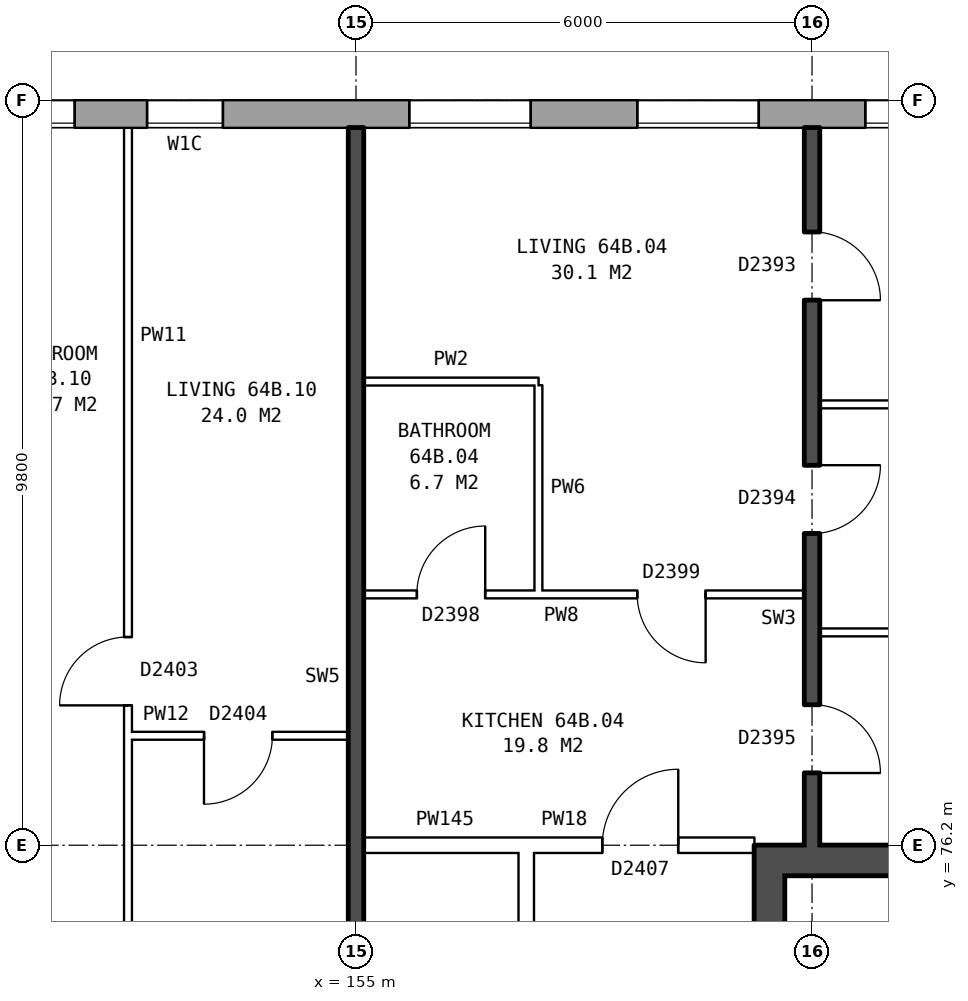
"""IFC4 building model, lengths in metres.
Left out: names, types, materials, properties, quantities, classifications, styles, units other than length and angle.
Written with IfcOpenShell. Run it as: python <this file> out.ifc"""

import sys

from ifc_helpers import new_model, si_unit, direction, frame, frame_2d, origin, place, context, subcontext, project, spatial, rectangle, extrude, element, fill, save


model = new_model("IFC4")
c1 = context("Model", 3, precision=1e-05, world=origin(), true_north=direction((0.0, 1.0)))
c2 = subcontext(c1, "Body", "Model", "MODEL_VIEW")
j1 = project(units=[si_unit("LENGTHUNIT", "METRE"), si_unit("PLANEANGLEUNIT", "RADIAN")], contexts=[c1])
p1 = place(None, origin())
s1 = spatial("IfcSite", under=j1, at=p1, CompositionType="ELEMENT")
p2 = place(p1, origin())
s2 = spatial("IfcBuilding", under=s1, at=p2, CompositionType="ELEMENT")
p3 = place(p2, frame((0.0, 0.0, 227.6)))
s3 = spatial("IfcBuildingStorey", under=s2, at=p3, CompositionType="ELEMENT", Elevation=227.6)
p4 = place(p3, frame((165.925, 85.82, 0.0), z_axis=(0.0, 0.0, 1.0), x_axis=(-1.0, 0.0, 0.0)))
e1 = element("IfcWall", 1, at=p4, inside=s3, PredefinedType="STANDARD", context=c2, shape_type="SweptSolid", body=[
    extrude(rectangle(XDim=33.875, YDim=0.36, at=frame_2d((16.938, 0.0))), origin(), (0.0, 0.0, 1.0), 2.85),
])
p5 = place(p4, frame((2.625, 0.0, 0.8)))
e2 = element("IfcOpeningElement", 2, at=p5, cuts=e1, PredefinedType="OPENING", context=c2, shape_type="SweptSolid", body=[
    extrude(rectangle(XDim=1.6, YDim=1.8, at=frame_2d((0.8, 0.9))), frame((0.0, 0.19, 0.0), z_axis=(0.0, -1.0, 0.0), x_axis=(1.0, 0.0, 0.0)), (0.0, 0.0, 1.0), 0.38),
])
p6 = place(p4, frame((5.625, 0.0, 0.8)))
e3 = element("IfcOpeningElement", 3, at=p6, cuts=e1, PredefinedType="OPENING", context=c2, shape_type="SweptSolid", body=[
    extrude(rectangle(XDim=1.6, YDim=1.8, at=frame_2d((0.8, 0.9))), frame((0.0, 0.19, 0.0), z_axis=(0.0, -1.0, 0.0), x_axis=(1.0, 0.0, 0.0)), (0.0, 0.0, 1.0), 0.38),
])
p7 = place(p4, frame((8.625, 0.0, 0.8)))
e4 = element("IfcOpeningElement", 4, at=p7, cuts=e1, PredefinedType="OPENING", context=c2, shape_type="SweptSolid", body=[
    extrude(rectangle(XDim=1.6, YDim=1.8, at=frame_2d((0.8, 0.9))), frame((0.0, 0.19, 0.0), z_axis=(0.0, -1.0, 0.0), x_axis=(1.0, 0.0, 0.0)), (0.0, 0.0, 1.0), 0.38),
])
p8 = place(p4, frame((12.675, 0.0, 0.15)))
e5 = element("IfcOpeningElement", 5, at=p8, cuts=e1, PredefinedType="OPENING", context=c2, shape_type="SweptSolid", body=[
    extrude(rectangle(XDim=1.0, YDim=1.8, at=frame_2d((0.5, 0.9))), frame((0.0, 0.19, 0.0), z_axis=(0.0, -1.0, 0.0), x_axis=(1.0, 0.0, 0.0)), (0.0, 0.0, 1.0), 0.38),
])
p9 = place(p4, frame((14.625, 0.0, 0.8)))
e6 = element("IfcOpeningElement", 6, at=p9, cuts=e1, PredefinedType="OPENING", context=c2, shape_type="SweptSolid", body=[
    extrude(rectangle(XDim=1.6, YDim=1.8, at=frame_2d((0.8, 0.9))), frame((0.0, 0.19, 0.0), z_axis=(0.0, -1.0, 0.0), x_axis=(1.0, 0.0, 0.0)), (0.0, 0.0, 1.0), 0.38),
])
p10 = place(p4, frame((17.125, 0.0, 0.8)))
e7 = element("IfcOpeningElement", 7, at=p10, cuts=e1, PredefinedType="OPENING", context=c2, shape_type="SweptSolid", body=[
    extrude(rectangle(XDim=1.6, YDim=1.8, at=frame_2d((0.8, 0.9))), frame((0.0, 0.19, 0.0), z_axis=(0.0, -1.0, 0.0), x_axis=(1.0, 0.0, 0.0)), (0.0, 0.0, 1.0), 0.38),
])
p11 = place(p4, frame((20.425, 0.0, 1.7)))
e8 = element("IfcOpeningElement", 8, at=p11, cuts=e1, PredefinedType="OPENING", context=c2, shape_type="SweptSolid", body=[
    extrude(rectangle(XDim=0.6, YDim=0.9, at=frame_2d((0.3, 0.45))), frame((0.0, 0.19, 0.0), z_axis=(0.0, -1.0, 0.0), x_axis=(1.0, 0.0, 0.0)), (0.0, 0.0, 1.0), 0.38),
])
p12 = place(p4, frame((23.625, 0.0, 0.8)))
e9 = element("IfcOpeningElement", 9, at=p12, cuts=e1, PredefinedType="OPENING", context=c2, shape_type="SweptSolid", body=[
    extrude(rectangle(XDim=1.6, YDim=1.8, at=frame_2d((0.8, 0.9))), frame((0.0, 0.19, 0.0), z_axis=(0.0, -1.0, 0.0), x_axis=(1.0, 0.0, 0.0)), (0.0, 0.0, 1.0), 0.38),
])
p13 = place(p4, frame((26.625, 0.0, 0.8)))
e10 = element("IfcOpeningElement", 10, at=p13, cuts=e1, PredefinedType="OPENING", context=c2, shape_type="SweptSolid", body=[
    extrude(rectangle(XDim=1.6, YDim=1.8, at=frame_2d((0.8, 0.9))), frame((0.0, 0.19, 0.0), z_axis=(0.0, -1.0, 0.0), x_axis=(1.0, 0.0, 0.0)), (0.0, 0.0, 1.0), 0.38),
])
p14 = place(p4, frame((29.625, 0.0, 0.8)))
e11 = element("IfcOpeningElement", 11, at=p14, cuts=e1, PredefinedType="OPENING", context=c2, shape_type="SweptSolid", body=[
    extrude(rectangle(XDim=1.6, YDim=1.8, at=frame_2d((0.8, 0.9))), frame((0.0, 0.19, 0.0), z_axis=(0.0, -1.0, 0.0), x_axis=(1.0, 0.0, 0.0)), (0.0, 0.0, 1.0), 0.38),
])
p15 = place(p4, frame((21.325, 0.0, 0.8)))
e12 = element("IfcOpeningElement", 12, at=p15, cuts=e1, PredefinedType="OPENING", context=c2, shape_type="SweptSolid", body=[
    extrude(rectangle(XDim=1.4, YDim=1.8, at=frame_2d((0.7, 0.9))), frame((0.0, 0.19, 0.0), z_axis=(0.0, -1.0, 0.0), x_axis=(1.0, 0.0, 0.0)), (0.0, 0.0, 1.0), 0.38),
])
p16 = place(p3, frame((160.44, 76.2, 0.0), z_axis=(0.0, 0.0, 1.0), x_axis=(0.0, -1.0, 0.0)))
e13 = element("IfcWall", 13, at=p16, inside=s3, PredefinedType="SHEAR", context=c2, shape_type="SweptSolid", body=[
    extrude(rectangle(XDim=12.4, YDim=0.4, at=frame_2d((6.2, 0.0))), origin(), (0.0, 0.0, 1.0), 2.85),
])
p17 = place(p16, frame((1.325, 0.0, 0.0)))
e14 = element("IfcOpeningElement", 14, at=p17, cuts=e13, PredefinedType="OPENING", context=c2, shape_type="SweptSolid", body=[
    extrude(rectangle(XDim=1.1, YDim=2.1, at=frame_2d((0.55, 1.05))), frame((0.0, 0.21, 0.0), z_axis=(0.0, -1.0, 0.0), x_axis=(1.0, 0.0, 0.0)), (0.0, 0.0, 1.0), 0.42),
])
p18 = place(p16, frame((3.625, 0.0, 0.0)))
e15 = element("IfcOpeningElement", 15, at=p18, cuts=e13, PredefinedType="OPENING", context=c2, shape_type="SweptSolid", body=[
    extrude(rectangle(XDim=0.85, YDim=2.1, at=frame_2d((0.425, 1.05))), frame((0.0, 0.21, 0.0), z_axis=(0.0, -1.0, 0.0), x_axis=(1.0, 0.0, 0.0)), (0.0, 0.0, 1.0), 0.42),
])
p19 = place(p16, frame((5.775, 0.0, 0.0)))
e16 = element("IfcOpeningElement", 16, at=p19, cuts=e13, PredefinedType="OPENING", context=c2, shape_type="SweptSolid", body=[
    extrude(rectangle(XDim=0.85, YDim=2.1, at=frame_2d((0.425, 1.05))), frame((0.0, 0.21, 0.0), z_axis=(0.0, -1.0, 0.0), x_axis=(1.0, 0.0, 0.0)), (0.0, 0.0, 1.0), 0.42),
])
p20 = place(p16, frame((9.9, 0.0, 0.0)))
e17 = element("IfcOpeningElement", 17, at=p20, cuts=e13, PredefinedType="OPENING", context=c2, shape_type="SweptSolid", body=[
    extrude(rectangle(XDim=1.1, YDim=2.1, at=frame_2d((0.55, 1.05))), frame((0.0, 0.21, 0.0), z_axis=(0.0, -1.0, 0.0), x_axis=(1.0, 0.0, 0.0)), (0.0, 0.0, 1.0), 0.42),
])
p21 = place(p16, frame((8.125, 0.0, 0.0)))
e18 = element("IfcOpeningElement", 18, at=p21, cuts=e13, PredefinedType="OPENING", context=c2, shape_type="SweptSolid", body=[
    extrude(rectangle(XDim=0.85, YDim=2.1, at=frame_2d((0.425, 1.05))), frame((0.0, 0.21, 0.0), z_axis=(0.0, -1.0, 0.0), x_axis=(1.0, 0.0, 0.0)), (0.0, 0.0, 1.0), 0.42),
])
p22 = place(p3, frame((160.64, 76.0, 0.0), z_axis=(0.0, 0.0, 1.0), x_axis=(1.0, 0.0, 0.0)))
e19 = element("IfcWall", 19, at=p22, inside=s3, PredefinedType="SHEAR", context=c2, shape_type="SweptSolid", body=[
    extrude(rectangle(XDim=7.6, YDim=0.4, at=frame_2d((3.8, 0.0))), origin(), (0.0, 0.0, 1.0), 2.85),
])
p23 = place(p3, frame((157.24, 63.9, 0.0), z_axis=(0.0, 0.0, 1.0), x_axis=(0.0, 1.0, 0.0)))
e20 = element("IfcWall", 20, at=p23, inside=s3, PredefinedType="PARTITIONING", context=c2, shape_type="SweptSolid", body=[
    extrude(rectangle(XDim=12.2, YDim=0.2, at=frame_2d((6.1, 0.0))), origin(), (0.0, 0.0, 1.0), 2.85),
])
p24 = place(p23, frame((5.1, 0.0, 0.0)))
e21 = element("IfcOpeningElement", 21, at=p24, cuts=e20, PredefinedType="OPENING", context=c2, shape_type="SweptSolid", body=[
    extrude(rectangle(XDim=2.0, YDim=2.1, at=frame_2d((1.0, 1.05))), frame((0.0, 0.11, 0.0), z_axis=(0.0, -1.0, 0.0), x_axis=(1.0, 0.0, 0.0)), (0.0, 0.0, 1.0), 0.22),
])
p25 = place(p3, frame((155.1, 76.2, 0.0), z_axis=(0.0, 0.0, 1.0), x_axis=(1.0, 0.0, 0.0)))
e22 = element("IfcWall", 22, at=p25, inside=s3, PredefinedType="PARTITIONING", context=c2, shape_type="SweptSolid", body=[
    extrude(rectangle(XDim=2.14, YDim=0.2, at=frame_2d((1.07, 0.0))), origin(), (0.0, 0.0, 1.0), 2.85),
])
p26 = place(p3, frame((157.24, 76.2, 0.0), z_axis=(0.0, 0.0, 1.0), x_axis=(1.0, 0.0, 0.0)))
e23 = element("IfcWall", 23, at=p26, inside=s3, PredefinedType="PARTITIONING", context=c2, shape_type="SweptSolid", body=[
    extrude(rectangle(XDim=3.0, YDim=0.2, at=frame_2d((1.5, 0.0))), origin(), (0.0, 0.0, 1.0), 2.85),
])
p27 = place(p26, frame((1.0, 0.0, 0.0)))
e24 = element("IfcOpeningElement", 24, at=p27, cuts=e23, PredefinedType="OPENING", context=c2, shape_type="SweptSolid", body=[
    extrude(rectangle(XDim=1.0, YDim=2.1, at=frame_2d((0.5, 1.05))), frame((0.0, 0.11, 0.0), z_axis=(0.0, -1.0, 0.0), x_axis=(1.0, 0.0, 0.0)), (0.0, 0.0, 1.0), 0.22),
])
p28 = place(p3, frame((152.0, 77.64, 0.0), z_axis=(0.0, 0.0, 1.0), x_axis=(1.0, 0.0, 0.0)))
e25 = element("IfcWall", 25, at=p28, inside=s3, PredefinedType="PARTITIONING", context=c2, shape_type="SweptSolid", body=[
    extrude(rectangle(XDim=2.9, YDim=0.1, at=frame_2d((1.45, 0.0))), origin(), (0.0, 0.0, 1.0), 2.85),
])
p29 = place(p28, frame((1.0, 0.0, 0.0)))
e26 = element("IfcOpeningElement", 26, at=p29, cuts=e25, PredefinedType="OPENING", context=c2, shape_type="SweptSolid", body=[
    extrude(rectangle(XDim=0.9, YDim=2.1, at=frame_2d((0.45, 1.05))), frame((0.0, 0.06, 0.0), z_axis=(0.0, -1.0, 0.0), x_axis=(1.0, 0.0, 0.0)), (0.0, 0.0, 1.0), 0.12),
])
p30 = place(p3, frame((161.1, 79.0, 0.0), z_axis=(0.0, 0.0, 1.0), x_axis=(1.0, 0.0, 0.0)))
e27 = element("IfcWall", 27, at=p30, inside=s3, PredefinedType="PARTITIONING", context=c2, shape_type="SweptSolid", body=[
    extrude(rectangle(XDim=7.54, YDim=0.1, at=frame_2d((3.77, 0.0))), origin(), (0.0, 0.0, 1.0), 2.85),
])
p31 = place(p3, frame((155.1, 79.5, 0.0), z_axis=(0.0, 0.0, 1.0), x_axis=(1.0, 0.0, 0.0)))
e28 = element("IfcWall", 28, at=p31, inside=s3, PredefinedType="PARTITIONING", context=c2, shape_type="SweptSolid", body=[
    extrude(rectangle(XDim=5.8, YDim=0.1, at=frame_2d((2.9, 0.0))), origin(), (0.0, 0.0, 1.0), 2.85),
])
p32 = place(p31, frame((3.6, 0.0, 0.0)))
e29 = element("IfcOpeningElement", 29, at=p32, cuts=e28, PredefinedType="OPENING", context=c2, shape_type="SweptSolid", body=[
    extrude(rectangle(XDim=0.9, YDim=2.1, at=frame_2d((0.45, 1.05))), frame((0.0, 0.06, 0.0), z_axis=(0.0, -1.0, 0.0), x_axis=(1.0, 0.0, 0.0)), (0.0, 0.0, 1.0), 0.12),
])
p33 = place(p31, frame((0.7, 0.0, 0.0)))
e30 = element("IfcOpeningElement", 30, at=p33, cuts=e28, PredefinedType="OPENING", context=c2, shape_type="SweptSolid", body=[
    extrude(rectangle(XDim=0.9, YDim=2.1, at=frame_2d((0.45, 1.05))), frame((0.0, 0.06, 0.0), z_axis=(0.0, -1.0, 0.0), x_axis=(1.0, 0.0, 0.0)), (0.0, 0.0, 1.0), 0.12),
])
p34 = place(p3, frame((161.1, 82.0, 0.0), z_axis=(0.0, 0.0, 1.0), x_axis=(1.0, 0.0, 0.0)))
e31 = element("IfcWall", 31, at=p34, inside=s3, PredefinedType="PARTITIONING", context=c2, shape_type="SweptSolid", body=[
    extrude(rectangle(XDim=7.54, YDim=0.1, at=frame_2d((3.77, 0.0))), origin(), (0.0, 0.0, 1.0), 2.85),
])
p35 = place(p3, frame((155.1, 82.3, 0.0), z_axis=(0.0, 0.0, 1.0), x_axis=(1.0, 0.0, 0.0)))
e32 = element("IfcWall", 32, at=p35, inside=s3, PredefinedType="PARTITIONING", context=c2, shape_type="SweptSolid", body=[
    extrude(rectangle(XDim=2.3, YDim=0.1, at=frame_2d((1.15, 0.0))), origin(), (0.0, 0.0, 1.0), 2.85),
])
p36 = place(p3, frame((152.0, 71.3, 0.0), z_axis=(0.0, 0.0, 1.0), x_axis=(0.0, 1.0, 0.0)))
e33 = element("IfcWall", 33, at=p36, inside=s3, PredefinedType="PARTITIONING", context=c2, shape_type="SweptSolid", body=[
    extrude(rectangle(XDim=14.34, YDim=0.1, at=frame_2d((7.17, 0.0))), origin(), (0.0, 0.0, 1.0), 2.85),
])
p37 = place(p36, frame((6.74, 0.0, 0.0)))
e34 = element("IfcOpeningElement", 34, at=p37, cuts=e33, PredefinedType="OPENING", context=c2, shape_type="SweptSolid", body=[
    extrude(rectangle(XDim=0.9, YDim=2.1, at=frame_2d((0.45, 1.05))), frame((0.0, 0.06, 0.0), z_axis=(0.0, -1.0, 0.0), x_axis=(1.0, 0.0, 0.0)), (0.0, 0.0, 1.0), 0.12),
])
p38 = place(p36, frame((0.4, 0.0, 0.0)))
e35 = element("IfcOpeningElement", 35, at=p38, cuts=e33, PredefinedType="OPENING", context=c2, shape_type="SweptSolid", body=[
    extrude(rectangle(XDim=0.9, YDim=2.1, at=frame_2d((0.45, 1.05))), frame((0.0, 0.06, 0.0), z_axis=(0.0, -1.0, 0.0), x_axis=(1.0, 0.0, 0.0)), (0.0, 0.0, 1.0), 0.12),
])
p39 = place(p3, frame((155.0, 71.2, 0.0), z_axis=(0.0, 0.0, 1.0), x_axis=(0.0, 1.0, 0.0)))
e36 = element("IfcWall", 36, at=p39, inside=s3, PredefinedType="SOLIDWALL", context=c2, shape_type="SweptSolid", body=[
    extrude(rectangle(XDim=14.44, YDim=0.2, at=frame_2d((7.22, 0.0))), origin(), (0.0, 0.0, 1.0), 2.85),
])
p40 = place(p3, frame((157.4, 79.55, 0.0), z_axis=(0.0, 0.0, 1.0), x_axis=(0.0, 1.0, 0.0)))
e37 = element("IfcWall", 37, at=p40, inside=s3, PredefinedType="PARTITIONING", context=c2, shape_type="SweptSolid", body=[
    extrude(rectangle(XDim=2.7, YDim=0.1, at=frame_2d((1.35, 0.0))), origin(), (0.0, 0.0, 1.0), 2.85),
])
p41 = place(p3, frame((161.0, 76.2, 0.0), z_axis=(0.0, 0.0, 1.0), x_axis=(0.0, 1.0, 0.0)))
e38 = element("IfcWall", 38, at=p41, inside=s3, PredefinedType="SOLIDWALL", context=c2, shape_type="SweptSolid", body=[
    extrude(rectangle(XDim=9.44, YDim=0.2, at=frame_2d((4.72, 0.0))), origin(), (0.0, 0.0, 1.0), 2.85),
])
p42 = place(p41, frame((7.17, 0.0, 0.0)))
e39 = element("IfcOpeningElement", 39, at=p42, cuts=e38, PredefinedType="OPENING", context=c2, shape_type="SweptSolid", body=[
    extrude(rectangle(XDim=0.9, YDim=2.1, at=frame_2d((0.45, 1.05))), frame((0.0, 0.11, 0.0), z_axis=(0.0, -1.0, 0.0), x_axis=(1.0, 0.0, 0.0)), (0.0, 0.0, 1.0), 0.22),
])
p43 = place(p41, frame((4.1, 0.0, 0.0)))
e40 = element("IfcOpeningElement", 40, at=p43, cuts=e38, PredefinedType="OPENING", context=c2, shape_type="SweptSolid", body=[
    extrude(rectangle(XDim=0.9, YDim=2.1, at=frame_2d((0.45, 1.05))), frame((0.0, 0.11, 0.0), z_axis=(0.0, -1.0, 0.0), x_axis=(1.0, 0.0, 0.0)), (0.0, 0.0, 1.0), 0.22),
])
p44 = place(p41, frame((0.95, 0.0, 0.0)))
e41 = element("IfcOpeningElement", 41, at=p44, cuts=e38, PredefinedType="OPENING", context=c2, shape_type="SweptSolid", body=[
    extrude(rectangle(XDim=0.9, YDim=2.1, at=frame_2d((0.45, 1.05))), frame((0.0, 0.11, 0.0), z_axis=(0.0, -1.0, 0.0), x_axis=(1.0, 0.0, 0.0)), (0.0, 0.0, 1.0), 0.22),
])
p45 = place(p5, origin())
e42 = element("IfcWindow", 42, at=p45, inside=s3, PartitioningType="SINGLE_PANEL", PredefinedType="WINDOW", context=c2, shape_type="SweptSolid", body=[
    extrude(rectangle(XDim=1.6, YDim=1.8, at=frame_2d((0.8, 0.9))), frame((0.0, 0.15, 0.0), z_axis=(0.0, -1.0, 0.0), x_axis=(1.0, 0.0, 0.0)), (0.0, 0.0, 1.0), 0.06),
])
fill(e2, e42)
p46 = place(p6, origin())
e43 = element("IfcWindow", 43, at=p46, inside=s3, PartitioningType="SINGLE_PANEL", PredefinedType="WINDOW", context=c2, shape_type="SweptSolid", body=[
    extrude(rectangle(XDim=1.6, YDim=1.8, at=frame_2d((0.8, 0.9))), frame((0.0, 0.15, 0.0), z_axis=(0.0, -1.0, 0.0), x_axis=(1.0, 0.0, 0.0)), (0.0, 0.0, 1.0), 0.06),
])
fill(e3, e43)
p47 = place(p7, origin())
e44 = element("IfcWindow", 44, at=p47, inside=s3, PartitioningType="SINGLE_PANEL", PredefinedType="WINDOW", context=c2, shape_type="SweptSolid", body=[
    extrude(rectangle(XDim=1.6, YDim=1.8, at=frame_2d((0.8, 0.9))), frame((0.0, 0.15, 0.0), z_axis=(0.0, -1.0, 0.0), x_axis=(1.0, 0.0, 0.0)), (0.0, 0.0, 1.0), 0.06),
])
fill(e4, e44)
p48 = place(p8, origin())
e45 = element("IfcWindow", 45, at=p48, inside=s3, PartitioningType="SINGLE_PANEL", PredefinedType="WINDOW", context=c2, shape_type="SweptSolid", body=[
    extrude(rectangle(XDim=1.0, YDim=1.8, at=frame_2d((0.5, 0.9))), frame((0.0, 0.15, 0.0), z_axis=(0.0, -1.0, 0.0), x_axis=(1.0, 0.0, 0.0)), (0.0, 0.0, 1.0), 0.06),
])
fill(e5, e45)
p49 = place(p9, origin())
e46 = element("IfcWindow", 46, at=p49, inside=s3, PartitioningType="SINGLE_PANEL", PredefinedType="WINDOW", context=c2, shape_type="SweptSolid", body=[
    extrude(rectangle(XDim=1.6, YDim=1.8, at=frame_2d((0.8, 0.9))), frame((0.0, 0.15, 0.0), z_axis=(0.0, -1.0, 0.0), x_axis=(1.0, 0.0, 0.0)), (0.0, 0.0, 1.0), 0.06),
])
fill(e6, e46)
p50 = place(p42, frame((0.9, 0.0, 0.0), z_axis=(0.0, 0.0, 1.0), x_axis=(-1.0, 0.0, 0.0)))
e47 = element("IfcDoor", 47, at=p50, inside=s3, OperationType="SINGLE_SWING_RIGHT", PredefinedType="DOOR", context=c2, shape_type="SweptSolid", body=[
    extrude(rectangle(XDim=0.9, YDim=2.1, at=frame_2d((0.45, 1.05))), frame((0.0, 0.025, 0.0), z_axis=(0.0, -1.0, 0.0), x_axis=(1.0, 0.0, 0.0)), (0.0, 0.0, 1.0), 0.05),
])
fill(e39, e47)
p51 = place(p43, frame((0.9, 0.0, 0.0), z_axis=(0.0, 0.0, 1.0), x_axis=(-1.0, 0.0, 0.0)))
e48 = element("IfcDoor", 48, at=p51, inside=s3, OperationType="SINGLE_SWING_LEFT", PredefinedType="DOOR", context=c2, shape_type="SweptSolid", body=[
    extrude(rectangle(XDim=0.9, YDim=2.1, at=frame_2d((0.45, 1.05))), frame((0.0, 0.025, 0.0), z_axis=(0.0, -1.0, 0.0), x_axis=(1.0, 0.0, 0.0)), (0.0, 0.0, 1.0), 0.05),
])
fill(e40, e48)
p52 = place(p44, frame((0.9, 0.0, 0.0), z_axis=(0.0, 0.0, 1.0), x_axis=(-1.0, 0.0, 0.0)))
e49 = element("IfcDoor", 49, at=p52, inside=s3, OperationType="SINGLE_SWING_RIGHT", PredefinedType="DOOR", context=c2, shape_type="SweptSolid", body=[
    extrude(rectangle(XDim=0.9, YDim=2.1, at=frame_2d((0.45, 1.05))), frame((0.0, 0.025, 0.0), z_axis=(0.0, -1.0, 0.0), x_axis=(1.0, 0.0, 0.0)), (0.0, 0.0, 1.0), 0.05),
])
fill(e41, e49)
p53 = place(p27, origin())
e50 = element("IfcDoor", 50, at=p53, inside=s3, OperationType="SINGLE_SWING_RIGHT", PredefinedType="DOOR", context=c2, shape_type="SweptSolid", body=[
    extrude(rectangle(XDim=1.0, YDim=2.1, at=frame_2d((0.5, 1.05))), frame((0.0, 0.025, 0.0), z_axis=(0.0, -1.0, 0.0), x_axis=(1.0, 0.0, 0.0)), (0.0, 0.0, 1.0), 0.05),
])
fill(e24, e50)
p54 = place(p32, frame((0.9, 0.0, 0.0), z_axis=(0.0, 0.0, 1.0), x_axis=(-1.0, 0.0, 0.0)))
e51 = element("IfcDoor", 51, at=p54, inside=s3, OperationType="SINGLE_SWING_LEFT", PredefinedType="DOOR", context=c2, shape_type="SweptSolid", body=[
    extrude(rectangle(XDim=0.9, YDim=2.1, at=frame_2d((0.45, 1.05))), frame((0.0, 0.025, 0.0), z_axis=(0.0, -1.0, 0.0), x_axis=(1.0, 0.0, 0.0)), (0.0, 0.0, 1.0), 0.05),
])
fill(e29, e51)
p55 = place(p33, origin())
e52 = element("IfcDoor", 52, at=p55, inside=s3, OperationType="SINGLE_SWING_RIGHT", PredefinedType="DOOR", context=c2, shape_type="SweptSolid", body=[
    extrude(rectangle(XDim=0.9, YDim=2.1, at=frame_2d((0.45, 1.05))), frame((0.0, 0.025, 0.0), z_axis=(0.0, -1.0, 0.0), x_axis=(1.0, 0.0, 0.0)), (0.0, 0.0, 1.0), 0.05),
])
fill(e30, e52)
p56 = place(p37, origin())
e53 = element("IfcDoor", 53, at=p56, inside=s3, OperationType="SINGLE_SWING_LEFT", PredefinedType="DOOR", context=c2, shape_type="SweptSolid", body=[
    extrude(rectangle(XDim=0.9, YDim=2.1, at=frame_2d((0.45, 1.05))), frame((0.0, 0.025, 0.0), z_axis=(0.0, -1.0, 0.0), x_axis=(1.0, 0.0, 0.0)), (0.0, 0.0, 1.0), 0.05),
])
fill(e34, e53)
p57 = place(p29, frame((0.9, 0.0, 0.0), z_axis=(0.0, 0.0, 1.0), x_axis=(-1.0, 0.0, 0.0)))
e54 = element("IfcDoor", 54, at=p57, inside=s3, OperationType="SINGLE_SWING_RIGHT", PredefinedType="DOOR", context=c2, shape_type="SweptSolid", body=[
    extrude(rectangle(XDim=0.9, YDim=2.1, at=frame_2d((0.45, 1.05))), frame((0.0, 0.025, 0.0), z_axis=(0.0, -1.0, 0.0), x_axis=(1.0, 0.0, 0.0)), (0.0, 0.0, 1.0), 0.05),
])
fill(e26, e54)
save(model, sys.argv[1])
